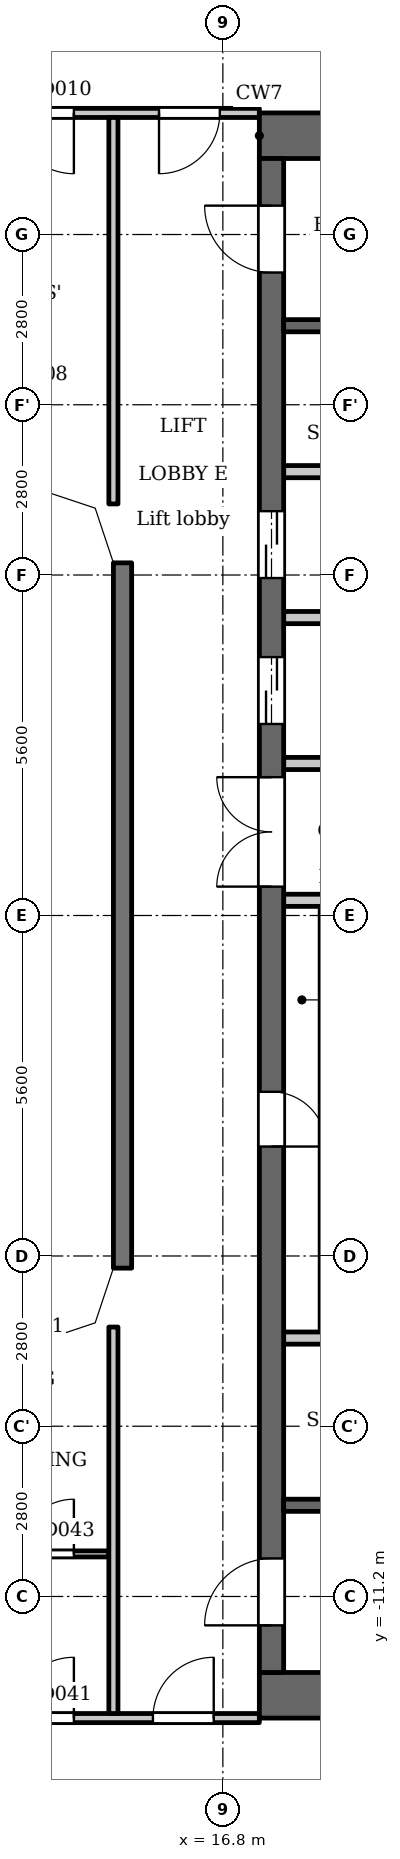
"""IFC4 building model, lengths in metres.
Left out: names, types, materials, properties, quantities, classifications, styles, units other than length and angle.
Written with IfcOpenShell. Run it as: python <this file> out.ifc"""

import sys

from ifc_helpers import new_model, si_unit, direction, frame, frame_2d, origin, place, context, subcontext, project, spatial, polyline, rectangle, outline, extrude, element, fill, save


model = new_model("IFC4")
c1 = context("Model", 3, precision=1e-05, world=origin(), true_north=direction((0.0, 1.0)))
c2 = subcontext(c1, "Body", "Model", "MODEL_VIEW")
j1 = project(units=[si_unit("LENGTHUNIT", "METRE"), si_unit("PLANEANGLEUNIT", "RADIAN")], contexts=[c1])
p1 = place(None, origin())
s1 = spatial("IfcSite", under=j1, at=p1, CompositionType="ELEMENT")
p2 = place(p1, origin())
s2 = spatial("IfcBuilding", under=s1, at=p2, CompositionType="ELEMENT")
p3 = place(p2, frame((0.0, 0.0, 227.4)))
s3 = spatial("IfcBuildingStorey", under=s2, at=p3, CompositionType="ELEMENT", Elevation=227.4)
p4 = place(p3, frame((15.15, 5.8, 0.0), z_axis=(0.0, 0.0, 1.0), x_axis=(0.0, -1.0, 0.0)))
e1 = element("IfcWall", 1, at=p4, inside=s3, PredefinedType="SOLIDWALL", context=c2, shape_type="SweptSolid", body=[
    extrude(rectangle(XDim=11.6, YDim=0.3, at=frame_2d((5.8, 0.0))), origin(), (0.0, 0.0, 1.0), 3.15),
])
for number, where, z_axis, x_axis in (
    (2, (17.4, 12.825, 0.0), (0.0, 0.0, 1.0), (1.0, 0.0, 0.0)),
    (3, (17.4, -12.825, 0.0), (0.0, 0.0, 1.0), (1.0, 0.0, 0.0)),
):
    element("IfcWall", number, at=place(p3, frame(where, z_axis=z_axis, x_axis=x_axis)), inside=s3, PredefinedType="SHEAR", context=c2, shape_type="SweptSolid", body=[
        extrude(rectangle(XDim=7.6, YDim=0.75, at=frame_2d((3.8, 0.0))), origin(), (0.0, 0.0, 1.0), 3.15),
    ])
p5 = place(p3, frame((17.6, -12.45, 0.0), z_axis=(0.0, 0.0, 1.0), x_axis=(0.0, 1.0, 0.0)))
e4 = element("IfcWall", 4, at=p5, inside=s3, PredefinedType="SHEAR", context=c2, shape_type="SweptSolid", body=[
    extrude(rectangle(XDim=24.9, YDim=0.4, at=frame_2d((12.45, 0.0))), origin(), (0.0, 0.0, 1.0), 3.15),
])
p6 = place(p5, frame((8.65, 0.0, 0.0)))
e5 = element("IfcOpeningElement", 5, at=p6, cuts=e4, PredefinedType="OPENING", context=c2, shape_type="SweptSolid", body=[
    extrude(rectangle(XDim=0.9, YDim=2.1, at=frame_2d((0.45, 1.05))), frame((0.0, 0.21, 0.0), z_axis=(0.0, -1.0, 0.0), x_axis=(1.0, 0.0, 0.0)), (0.0, 0.0, 1.0), 0.42),
])
p7 = place(p5, frame((15.6, 0.0, 0.0)))
e6 = element("IfcOpeningElement", 6, at=p7, cuts=e4, PredefinedType="OPENING", context=c2, shape_type="SweptSolid", body=[
    extrude(rectangle(XDim=1.1, YDim=2.1, at=frame_2d((0.55, 1.05))), frame((0.0, 0.21, 0.0), z_axis=(0.0, -1.0, 0.0), x_axis=(1.0, 0.0, 0.0)), (0.0, 0.0, 1.0), 0.42),
])
p8 = place(p5, frame((18.0, 0.0, 0.0)))
e7 = element("IfcOpeningElement", 7, at=p8, cuts=e4, PredefinedType="OPENING", context=c2, shape_type="SweptSolid", body=[
    extrude(rectangle(XDim=1.1, YDim=2.1, at=frame_2d((0.55, 1.05))), frame((0.0, 0.21, 0.0), z_axis=(0.0, -1.0, 0.0), x_axis=(1.0, 0.0, 0.0)), (0.0, 0.0, 1.0), 0.42),
])
p9 = place(p5, frame((23.025, 0.0, 0.0)))
e8 = element("IfcOpeningElement", 8, at=p9, cuts=e4, PredefinedType="OPENING", context=c2, shape_type="SweptSolid", body=[
    extrude(rectangle(XDim=1.1, YDim=2.1, at=frame_2d((0.55, 1.05))), frame((0.0, 0.21, 0.0), z_axis=(0.0, -1.0, 0.0), x_axis=(1.0, 0.0, 0.0)), (0.0, 0.0, 1.0), 0.42),
])
p10 = place(p5, frame((0.775, 0.0, 0.0)))
e9 = element("IfcOpeningElement", 9, at=p10, cuts=e4, PredefinedType="OPENING", context=c2, shape_type="SweptSolid", body=[
    extrude(rectangle(XDim=1.1, YDim=2.1, at=frame_2d((0.55, 1.05))), frame((0.0, 0.21, 0.0), z_axis=(0.0, -1.0, 0.0), x_axis=(1.0, 0.0, 0.0)), (0.0, 0.0, 1.0), 0.42),
])
p11 = place(p5, frame((12.925, 0.0, 0.0)))
e10 = element("IfcOpeningElement", 10, at=p11, cuts=e4, PredefinedType="OPENING", context=c2, shape_type="SweptSolid", body=[
    extrude(rectangle(XDim=1.8, YDim=2.1, at=frame_2d((0.9, 1.05))), frame((0.0, 0.21, 0.0), z_axis=(0.0, -1.0, 0.0), x_axis=(1.0, 0.0, 0.0)), (0.0, 0.0, 1.0), 0.42),
])
p12 = place(p3, frame((17.8, -9.7, 0.0), z_axis=(0.0, 0.0, 1.0), x_axis=(1.0, 0.0, 0.0)))
e11 = element("IfcWall", 11, at=p12, inside=s3, PredefinedType="SHEAR", context=c2, shape_type="SweptSolid", body=[
    extrude(rectangle(XDim=5.65, YDim=0.2, at=frame_2d((2.825, 0.0))), origin(), (0.0, 0.0, 1.0), 3.15),
])
p13 = place(p12, frame((0.85, 0.0, 0.0)))
e12 = element("IfcOpeningElement", 12, at=p13, cuts=e11, PredefinedType="OPENING", context=c2, shape_type="SweptSolid", body=[
    extrude(rectangle(XDim=1.1, YDim=2.1, at=frame_2d((0.55, 1.05))), frame((0.0, 0.11, 0.0), z_axis=(0.0, -1.0, 0.0), x_axis=(1.0, 0.0, 0.0)), (0.0, 0.0, 1.0), 0.22),
])
p14 = place(p12, frame((3.75, 0.0, 0.0)))
e13 = element("IfcOpeningElement", 13, at=p14, cuts=e11, PredefinedType="OPENING", context=c2, shape_type="SweptSolid", body=[
    extrude(rectangle(XDim=1.1, YDim=2.1, at=frame_2d((0.55, 1.05))), frame((0.0, 0.11, 0.0), z_axis=(0.0, -1.0, 0.0), x_axis=(1.0, 0.0, 0.0)), (0.0, 0.0, 1.0), 0.22),
])
p15 = place(p3, frame((17.8, -6.95, 0.0), z_axis=(0.0, 0.0, 1.0), x_axis=(1.0, 0.0, 0.0)))
e14 = element("IfcWall", 14, at=p15, inside=s3, PredefinedType="PARTITIONING", context=c2, shape_type="SweptSolid", body=[
    extrude(rectangle(XDim=2.8, YDim=0.2, at=frame_2d((1.4, 0.0))), origin(), (0.0, 0.0, 1.0), 3.15),
])
p16 = place(p3, frame((17.8, 0.25, 0.0), z_axis=(0.0, 0.0, 1.0), x_axis=(1.0, 0.0, 0.0)))
e15 = element("IfcWall", 15, at=p16, inside=s3, PredefinedType="PARTITIONING", context=c2, shape_type="SweptSolid", body=[
    extrude(rectangle(XDim=3.0, YDim=0.2, at=frame_2d((1.5, 0.0))), origin(), (0.0, 0.0, 1.0), 3.15),
])
p17 = place(p16, frame((1.35, 0.0, 0.0)))
e16 = element("IfcOpeningElement", 16, at=p17, cuts=e15, PredefinedType="OPENING", context=c2, shape_type="SweptSolid", body=[
    extrude(rectangle(XDim=0.9, YDim=2.1, at=frame_2d((0.45, 1.05))), frame((0.0, 0.11, 0.0), z_axis=(0.0, -1.0, 0.0), x_axis=(1.0, 0.0, 0.0)), (0.0, 0.0, 1.0), 0.22),
])
p18 = place(p3, frame((17.8, 2.5, 0.0), z_axis=(0.0, 0.0, 1.0), x_axis=(1.0, 0.0, 0.0)))
e17 = element("IfcWall", 17, at=p18, inside=s3, PredefinedType="PARTITIONING", context=c2, shape_type="SweptSolid", body=[
    extrude(rectangle(XDim=3.0, YDim=0.2, at=frame_2d((1.5, 0.0))), origin(), (0.0, 0.0, 1.0), 3.15),
])
for number, where, z_axis, x_axis in (
    (18, (17.8, 4.9, 0.0), (0.0, 0.0, 1.0), (1.0, 0.0, 0.0)),
    (19, (17.8, 7.3, 0.0), (0.0, 0.0, 1.0), (1.0, 0.0, 0.0)),
):
    element("IfcWall", number, at=place(p3, frame(where, z_axis=z_axis, x_axis=x_axis)), inside=s3, PredefinedType="PARTITIONING", context=c2, shape_type="SweptSolid", body=[
        extrude(rectangle(XDim=2.8, YDim=0.2, at=frame_2d((1.4, 0.0))), origin(), (0.0, 0.0, 1.0), 3.15),
    ])
p19 = place(p3, frame((17.8, 9.7, 0.0), z_axis=(0.0, 0.0, 1.0), x_axis=(1.0, 0.0, 0.0)))
e20 = element("IfcWall", 20, at=p19, inside=s3, PredefinedType="SHEAR", context=c2, shape_type="SweptSolid", body=[
    extrude(rectangle(XDim=5.65, YDim=0.2, at=frame_2d((2.825, 0.0))), origin(), (0.0, 0.0, 1.0), 3.15),
])
p20 = place(p19, frame((0.85, 0.0, 0.0)))
e21 = element("IfcOpeningElement", 21, at=p20, cuts=e20, PredefinedType="OPENING", context=c2, shape_type="SweptSolid", body=[
    extrude(rectangle(XDim=1.1, YDim=2.1, at=frame_2d((0.55, 1.05))), frame((0.0, 0.11, 0.0), z_axis=(0.0, -1.0, 0.0), x_axis=(1.0, 0.0, 0.0)), (0.0, 0.0, 1.0), 0.22),
])
p21 = place(p19, frame((3.75, 0.0, 0.0)))
e22 = element("IfcOpeningElement", 22, at=p21, cuts=e20, PredefinedType="OPENING", context=c2, shape_type="SweptSolid", body=[
    extrude(rectangle(XDim=1.1, YDim=2.1, at=frame_2d((0.55, 1.05))), frame((0.0, 0.11, 0.0), z_axis=(0.0, -1.0, 0.0), x_axis=(1.0, 0.0, 0.0)), (0.0, 0.0, 1.0), 0.22),
])
p22 = place(p3, frame((-17.4, -13.2, 0.0), z_axis=(0.0, 0.0, 1.0), x_axis=(1.0, 0.0, 0.0)))
e23 = element("IfcWall", 23, at=p22, inside=s3, PredefinedType="PARTITIONING", context=c2, shape_type="SweptSolid", body=[
    extrude(rectangle(XDim=34.8, YDim=0.15, at=frame_2d((17.4, 0.0))), origin(), (0.0, 0.0, 1.0), 3.15),
])
p23 = place(p22, frame((0.65, 0.0, 0.0)))
e24 = element("IfcOpeningElement", 24, at=p23, cuts=e23, PredefinedType="OPENING", context=c2, shape_type="SweptSolid", body=[
    extrude(rectangle(XDim=1.0, YDim=2.1, at=frame_2d((0.5, 1.05))), frame((0.0, 0.085, 0.0), z_axis=(0.0, -1.0, 0.0), x_axis=(1.0, 0.0, 0.0)), (0.0, 0.0, 1.0), 0.17),
])
p24 = place(p22, frame((33.05, 0.0, 0.0)))
e25 = element("IfcOpeningElement", 25, at=p24, cuts=e23, PredefinedType="OPENING", context=c2, shape_type="SweptSolid", body=[
    extrude(rectangle(XDim=1.0, YDim=2.1, at=frame_2d((0.5, 1.05))), frame((0.0, 0.085, 0.0), z_axis=(0.0, -1.0, 0.0), x_axis=(1.0, 0.0, 0.0)), (0.0, 0.0, 1.0), 0.17),
])
p25 = place(p22, frame((10.15, 0.0, 0.0)))
e26 = element("IfcOpeningElement", 26, at=p25, cuts=e23, PredefinedType="OPENING", context=c2, shape_type="SweptSolid", body=[
    extrude(rectangle(XDim=1.0, YDim=2.1, at=frame_2d((0.5, 1.05))), frame((0.0, 0.085, 0.0), z_axis=(0.0, -1.0, 0.0), x_axis=(1.0, 0.0, 0.0)), (0.0, 0.0, 1.0), 0.17),
])
p26 = place(p22, frame((12.5, 0.0, 0.0)))
e27 = element("IfcOpeningElement", 27, at=p26, cuts=e23, PredefinedType="OPENING", context=c2, shape_type="SweptSolid", body=[
    extrude(rectangle(XDim=1.0, YDim=2.1, at=frame_2d((0.5, 1.05))), frame((0.0, 0.085, 0.0), z_axis=(0.0, -1.0, 0.0), x_axis=(1.0, 0.0, 0.0)), (0.0, 0.0, 1.0), 0.17),
])
p27 = place(p22, frame((18.0, 0.0, 0.0)))
e28 = element("IfcOpeningElement", 28, at=p27, cuts=e23, PredefinedType="OPENING", context=c2, shape_type="SweptSolid", body=[
    extrude(rectangle(XDim=1.0, YDim=2.1, at=frame_2d((0.5, 1.05))), frame((0.0, 0.085, 0.0), z_axis=(0.0, -1.0, 0.0), x_axis=(1.0, 0.0, 0.0)), (0.0, 0.0, 1.0), 0.17),
])
p28 = place(p22, frame((30.75, 0.0, 0.0)))
e29 = element("IfcOpeningElement", 29, at=p28, cuts=e23, PredefinedType="OPENING", context=c2, shape_type="SweptSolid", body=[
    extrude(rectangle(XDim=1.0, YDim=2.1, at=frame_2d((0.5, 1.05))), frame((0.0, 0.085, 0.0), z_axis=(0.0, -1.0, 0.0), x_axis=(1.0, 0.0, 0.0)), (0.0, 0.0, 1.0), 0.17),
])
p29 = place(p3, frame((-14.925, -10.5, 0.0), z_axis=(0.0, 0.0, 1.0), x_axis=(1.0, 0.0, 0.0)))
e30 = element("IfcWall", 30, at=p29, inside=s3, PredefinedType="PARTITIONING", context=c2, shape_type="SweptSolid", body=[
    extrude(rectangle(XDim=29.85, YDim=0.1, at=frame_2d((14.925, 0.0))), origin(), (0.0, 0.0, 1.0), 3.15),
])
p30 = place(p29, frame((2.325, 0.0, 0.0)))
e31 = element("IfcOpeningElement", 31, at=p30, cuts=e30, PredefinedType="OPENING", context=c2, shape_type="SweptSolid", body=[
    extrude(rectangle(XDim=0.8, YDim=2.1, at=frame_2d((0.4, 1.05))), frame((0.0, 0.06, 0.0), z_axis=(0.0, -1.0, 0.0), x_axis=(1.0, 0.0, 0.0)), (0.0, 0.0, 1.0), 0.12),
])
p31 = place(p29, frame((7.775, 0.0, 0.0)))
e32 = element("IfcOpeningElement", 32, at=p31, cuts=e30, PredefinedType="OPENING", context=c2, shape_type="SweptSolid", body=[
    extrude(rectangle(XDim=0.9, YDim=2.1, at=frame_2d((0.45, 1.05))), frame((0.0, 0.06, 0.0), z_axis=(0.0, -1.0, 0.0), x_axis=(1.0, 0.0, 0.0)), (0.0, 0.0, 1.0), 0.12),
])
p32 = place(p29, frame((13.575, 0.0, 0.0)))
e33 = element("IfcOpeningElement", 33, at=p32, cuts=e30, PredefinedType="OPENING", context=c2, shape_type="SweptSolid", body=[
    extrude(rectangle(XDim=0.8, YDim=2.1, at=frame_2d((0.4, 1.05))), frame((0.0, 0.06, 0.0), z_axis=(0.0, -1.0, 0.0), x_axis=(1.0, 0.0, 0.0)), (0.0, 0.0, 1.0), 0.12),
])
p33 = place(p29, frame((10.125, 0.0, 0.0)))
e34 = element("IfcOpeningElement", 34, at=p33, cuts=e30, PredefinedType="OPENING", context=c2, shape_type="SweptSolid", body=[
    extrude(rectangle(XDim=0.9, YDim=2.1, at=frame_2d((0.45, 1.05))), frame((0.0, 0.06, 0.0), z_axis=(0.0, -1.0, 0.0), x_axis=(1.0, 0.0, 0.0)), (0.0, 0.0, 1.0), 0.12),
])
p34 = place(p29, frame((18.825, 0.0, 0.0)))
e35 = element("IfcOpeningElement", 35, at=p34, cuts=e30, PredefinedType="OPENING", context=c2, shape_type="SweptSolid", body=[
    extrude(rectangle(XDim=0.8, YDim=2.1, at=frame_2d((0.4, 1.05))), frame((0.0, 0.06, 0.0), z_axis=(0.0, -1.0, 0.0), x_axis=(1.0, 0.0, 0.0)), (0.0, 0.0, 1.0), 0.12),
])
p35 = place(p29, frame((15.625, 0.0, 0.0)))
e36 = element("IfcOpeningElement", 36, at=p35, cuts=e30, PredefinedType="OPENING", context=c2, shape_type="SweptSolid", body=[
    extrude(rectangle(XDim=0.9, YDim=2.1, at=frame_2d((0.45, 1.05))), frame((0.0, 0.06, 0.0), z_axis=(0.0, -1.0, 0.0), x_axis=(1.0, 0.0, 0.0)), (0.0, 0.0, 1.0), 0.12),
])
p36 = place(p29, frame((24.675, 0.0, 0.0)))
e37 = element("IfcOpeningElement", 37, at=p36, cuts=e30, PredefinedType="OPENING", context=c2, shape_type="SweptSolid", body=[
    extrude(rectangle(XDim=0.8, YDim=2.1, at=frame_2d((0.4, 1.05))), frame((0.0, 0.06, 0.0), z_axis=(0.0, -1.0, 0.0), x_axis=(1.0, 0.0, 0.0)), (0.0, 0.0, 1.0), 0.12),
])
p37 = place(p29, frame((28.375, 0.0, 0.0)))
e38 = element("IfcOpeningElement", 38, at=p37, cuts=e30, PredefinedType="OPENING", context=c2, shape_type="SweptSolid", body=[
    extrude(rectangle(XDim=0.9, YDim=2.1, at=frame_2d((0.45, 1.05))), frame((0.0, 0.06, 0.0), z_axis=(0.0, -1.0, 0.0), x_axis=(1.0, 0.0, 0.0)), (0.0, 0.0, 1.0), 0.12),
])
p38 = place(p3, frame((-17.4, 13.2, 0.0), z_axis=(0.0, 0.0, 1.0), x_axis=(1.0, 0.0, 0.0)))
e39 = element("IfcWall", 39, at=p38, inside=s3, PredefinedType="PARTITIONING", context=c2, shape_type="SweptSolid", body=[
    extrude(rectangle(XDim=34.8, YDim=0.15, at=frame_2d((17.4, 0.0))), origin(), (0.0, 0.0, 1.0), 3.15),
])
p39 = place(p38, frame((0.75, 0.0, 0.0)))
e40 = element("IfcOpeningElement", 40, at=p39, cuts=e39, PredefinedType="OPENING", context=c2, shape_type="SweptSolid", body=[
    extrude(rectangle(XDim=1.0, YDim=2.1, at=frame_2d((0.5, 1.05))), frame((0.0, 0.085, 0.0), z_axis=(0.0, -1.0, 0.0), x_axis=(1.0, 0.0, 0.0)), (0.0, 0.0, 1.0), 0.17),
])
p40 = place(p38, frame((33.15, 0.0, 0.0)))
e41 = element("IfcOpeningElement", 41, at=p40, cuts=e39, PredefinedType="OPENING", context=c2, shape_type="SweptSolid", body=[
    extrude(rectangle(XDim=1.0, YDim=2.1, at=frame_2d((0.5, 1.05))), frame((0.0, 0.085, 0.0), z_axis=(0.0, -1.0, 0.0), x_axis=(1.0, 0.0, 0.0)), (0.0, 0.0, 1.0), 0.17),
])
p41 = place(p38, frame((3.05, 0.0, 0.0)))
e42 = element("IfcOpeningElement", 42, at=p41, cuts=e39, PredefinedType="OPENING", context=c2, shape_type="SweptSolid", body=[
    extrude(rectangle(XDim=1.0, YDim=2.1, at=frame_2d((0.5, 1.05))), frame((0.0, 0.085, 0.0), z_axis=(0.0, -1.0, 0.0), x_axis=(1.0, 0.0, 0.0)), (0.0, 0.0, 1.0), 0.17),
])
p42 = place(p38, frame((10.1, 0.0, 0.0)))
e43 = element("IfcOpeningElement", 43, at=p42, cuts=e39, PredefinedType="OPENING", context=c2, shape_type="SweptSolid", body=[
    extrude(rectangle(XDim=1.0, YDim=2.1, at=frame_2d((0.5, 1.05))), frame((0.0, 0.085, 0.0), z_axis=(0.0, -1.0, 0.0), x_axis=(1.0, 0.0, 0.0)), (0.0, 0.0, 1.0), 0.17),
])
p43 = place(p38, frame((12.45, 0.0, 0.0)))
e44 = element("IfcOpeningElement", 44, at=p43, cuts=e39, PredefinedType="OPENING", context=c2, shape_type="SweptSolid", body=[
    extrude(rectangle(XDim=1.0, YDim=2.1, at=frame_2d((0.5, 1.05))), frame((0.0, 0.085, 0.0), z_axis=(0.0, -1.0, 0.0), x_axis=(1.0, 0.0, 0.0)), (0.0, 0.0, 1.0), 0.17),
])
p44 = place(p38, frame((21.3, 0.0, 0.0)))
e45 = element("IfcOpeningElement", 45, at=p44, cuts=e39, PredefinedType="OPENING", context=c2, shape_type="SweptSolid", body=[
    extrude(rectangle(XDim=1.0, YDim=2.1, at=frame_2d((0.5, 1.05))), frame((0.0, 0.085, 0.0), z_axis=(0.0, -1.0, 0.0), x_axis=(1.0, 0.0, 0.0)), (0.0, 0.0, 1.0), 0.17),
])
p45 = place(p38, frame((23.65, 0.0, 0.0)))
e46 = element("IfcOpeningElement", 46, at=p45, cuts=e39, PredefinedType="OPENING", context=c2, shape_type="SweptSolid", body=[
    extrude(rectangle(XDim=1.0, YDim=2.1, at=frame_2d((0.5, 1.05))), frame((0.0, 0.085, 0.0), z_axis=(0.0, -1.0, 0.0), x_axis=(1.0, 0.0, 0.0)), (0.0, 0.0, 1.0), 0.17),
])
p46 = place(p38, frame((30.75, 0.0, 0.0)))
e47 = element("IfcOpeningElement", 47, at=p46, cuts=e39, PredefinedType="OPENING", context=c2, shape_type="SweptSolid", body=[
    extrude(rectangle(XDim=1.0, YDim=2.1, at=frame_2d((0.5, 1.05))), frame((0.0, 0.085, 0.0), z_axis=(0.0, -1.0, 0.0), x_axis=(1.0, 0.0, 0.0)), (0.0, 0.0, 1.0), 0.17),
])
for number, where, z_axis, x_axis in (
    (48, (15.0, -13.125, 0.0), (0.0, 0.0, 1.0), (0.0, 1.0, 0.0)),
    (49, (15.0, 6.769, 0.0), (0.0, 0.0, 1.0), (0.0, 1.0, 0.0)),
):
    element("IfcWall", number, at=place(p3, frame(where, z_axis=z_axis, x_axis=x_axis)), inside=s3, PredefinedType="PARTITIONING", context=c2, shape_type="SweptSolid", body=[
        extrude(rectangle(XDim=6.356, YDim=0.15, at=frame_2d((3.178, 0.0))), origin(), (0.0, 0.0, 1.0), 3.15),
    ])
p47 = place(p3, origin())
e50 = element("IfcWall", 50, at=p47, inside=s3, PredefinedType="SOLIDWALL", context=c2, shape_type="SweptSolid", body=[
    extrude(outline(polyline([(14.937, 6.937), (13.849, 7.3), (13.8, 7.3), (13.8, 7.0), (14.7, 6.7), (15.0, 5.8), (15.3, 5.8), (15.3, 5.849), (14.937, 6.937)])), origin(), (0.0, 0.0, 1.0), 3.15),
])
e51 = element("IfcWall", 51, at=p47, inside=s3, PredefinedType="SOLIDWALL", context=c2, shape_type="SweptSolid", body=[
    extrude(outline(polyline([(14.937, -6.937), (15.3, -5.849), (15.3, -5.8), (15.0, -5.8), (14.7, -6.7), (13.8, -7.0), (13.8, -7.3), (13.849, -7.3), (14.937, -6.937)])), origin(), (0.0, 0.0, 1.0), 3.15),
])
p48 = place(p6, origin())
e52 = element("IfcDoor", 52, at=p48, inside=s3, OperationType="SINGLE_SWING_LEFT", PredefinedType="DOOR", context=c2, shape_type="SweptSolid", body=[
    extrude(rectangle(XDim=0.9, YDim=2.1, at=frame_2d((0.45, 1.05))), frame((0.0, 0.025, 0.0), z_axis=(0.0, -1.0, 0.0), x_axis=(1.0, 0.0, 0.0)), (0.0, 0.0, 1.0), 0.05),
])
fill(e5, e52)
p49 = place(p7, origin())
e53 = element("IfcDoor", 53, at=p49, inside=s3, OperationType="DOUBLE_DOOR_SLIDING", PredefinedType="DOOR", context=c2, shape_type="SweptSolid", body=[
    extrude(rectangle(XDim=1.1, YDim=2.1, at=frame_2d((0.55, 1.05))), frame((0.0, 0.025, 0.0), z_axis=(0.0, -1.0, 0.0), x_axis=(1.0, 0.0, 0.0)), (0.0, 0.0, 1.0), 0.05),
])
fill(e6, e53)
p50 = place(p8, origin())
e54 = element("IfcDoor", 54, at=p50, inside=s3, OperationType="DOUBLE_DOOR_SLIDING", PredefinedType="DOOR", context=c2, shape_type="SweptSolid", body=[
    extrude(rectangle(XDim=1.1, YDim=2.1, at=frame_2d((0.55, 1.05))), frame((0.0, 0.025, 0.0), z_axis=(0.0, -1.0, 0.0), x_axis=(1.0, 0.0, 0.0)), (0.0, 0.0, 1.0), 0.05),
])
fill(e7, e54)
p51 = place(p9, origin())
e55 = element("IfcDoor", 55, at=p51, inside=s3, OperationType="SINGLE_SWING_LEFT", PredefinedType="DOOR", context=c2, shape_type="SweptSolid", body=[
    extrude(rectangle(XDim=1.1, YDim=2.1, at=frame_2d((0.55, 1.05))), frame((0.0, 0.025, 0.0), z_axis=(0.0, -1.0, 0.0), x_axis=(1.0, 0.0, 0.0)), (0.0, 0.0, 1.0), 0.05),
])
fill(e8, e55)
p52 = place(p10, origin())
e56 = element("IfcDoor", 56, at=p52, inside=s3, OperationType="SINGLE_SWING_RIGHT", PredefinedType="DOOR", context=c2, shape_type="SweptSolid", body=[
    extrude(rectangle(XDim=1.1, YDim=2.1, at=frame_2d((0.55, 1.05))), frame((0.0, 0.025, 0.0), z_axis=(0.0, -1.0, 0.0), x_axis=(1.0, 0.0, 0.0)), (0.0, 0.0, 1.0), 0.05),
])
fill(e9, e56)
p53 = place(p11, origin())
e57 = element("IfcDoor", 57, at=p53, inside=s3, OperationType="DOUBLE_DOOR_SINGLE_SWING", PredefinedType="DOOR", context=c2, shape_type="SweptSolid", body=[
    extrude(rectangle(XDim=1.8, YDim=2.1, at=frame_2d((0.9, 1.05))), frame((0.0, 0.025, 0.0), z_axis=(0.0, -1.0, 0.0), x_axis=(1.0, 0.0, 0.0)), (0.0, 0.0, 1.0), 0.05),
])
fill(e10, e57)
p54 = place(p40, origin())
e58 = element("IfcDoor", 58, at=p54, inside=s3, OperationType="SINGLE_SWING_LEFT", PredefinedType="DOOR", context=c2, shape_type="SweptSolid", body=[
    extrude(rectangle(XDim=1.0, YDim=2.1, at=frame_2d((0.5, 1.05))), frame((0.0, 0.025, 0.0), z_axis=(0.0, -1.0, 0.0), x_axis=(1.0, 0.0, 0.0)), (0.0, 0.0, 1.0), 0.05),
])
fill(e41, e58)
p55 = place(p24, origin())
e59 = element("IfcDoor", 59, at=p55, inside=s3, OperationType="SINGLE_SWING_LEFT", PredefinedType="DOOR", context=c2, shape_type="SweptSolid", body=[
    extrude(rectangle(XDim=1.0, YDim=2.1, at=frame_2d((0.5, 1.05))), frame((0.0, 0.025, 0.0), z_axis=(0.0, -1.0, 0.0), x_axis=(1.0, 0.0, 0.0)), (0.0, 0.0, 1.0), 0.05),
])
fill(e25, e59)
p56 = place(p46, origin())
e60 = element("IfcDoor", 60, at=p56, inside=s3, OperationType="SINGLE_SWING_RIGHT", PredefinedType="DOOR", context=c2, shape_type="SweptSolid", body=[
    extrude(rectangle(XDim=1.0, YDim=2.1, at=frame_2d((0.5, 1.05))), frame((0.0, 0.025, 0.0), z_axis=(0.0, -1.0, 0.0), x_axis=(1.0, 0.0, 0.0)), (0.0, 0.0, 1.0), 0.05),
])
fill(e47, e60)
p57 = place(p28, origin())
e61 = element("IfcDoor", 61, at=p57, inside=s3, OperationType="SINGLE_SWING_LEFT", PredefinedType="DOOR", context=c2, shape_type="SweptSolid", body=[
    extrude(rectangle(XDim=1.0, YDim=2.1, at=frame_2d((0.5, 1.05))), frame((0.0, 0.025, 0.0), z_axis=(0.0, -1.0, 0.0), x_axis=(1.0, 0.0, 0.0)), (0.0, 0.0, 1.0), 0.05),
])
fill(e29, e61)
p58 = place(p37, origin())
e62 = element("IfcDoor", 62, at=p58, inside=s3, OperationType="SINGLE_SWING_LEFT", PredefinedType="DOOR", context=c2, shape_type="SweptSolid", body=[
    extrude(rectangle(XDim=0.9, YDim=2.1, at=frame_2d((0.45, 1.05))), frame((0.0, 0.025, 0.0), z_axis=(0.0, -1.0, 0.0), x_axis=(1.0, 0.0, 0.0)), (0.0, 0.0, 1.0), 0.05),
])
fill(e38, e62)
save(model, sys.argv[1])
